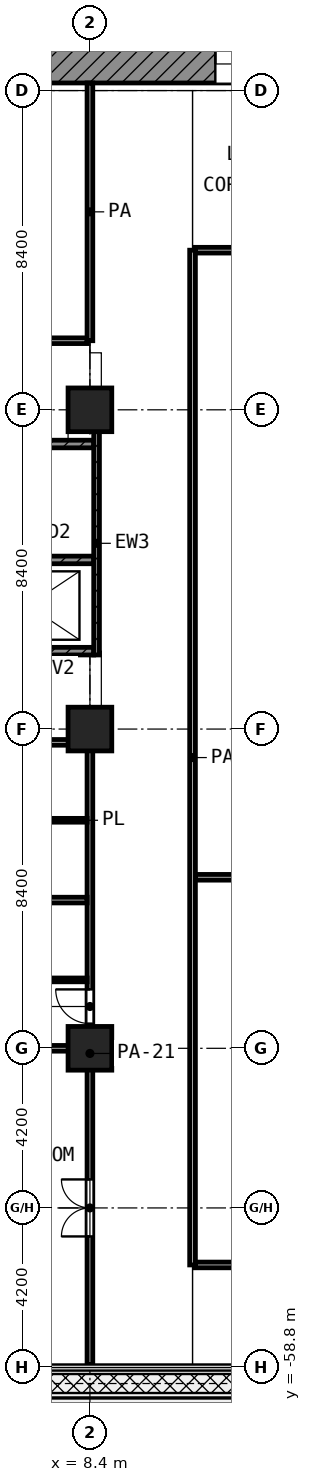
"""IFC4 building model, lengths in metres.
Left out: names, types, materials, properties, quantities, classifications, styles, units other than length and angle.
Written with IfcOpenShell. Run it as: python <this file> out.ifc"""

import sys

from ifc_helpers import new_model, si_unit, direction, frame, frame_2d, origin, origin_2d, place, context, subcontext, project, spatial, rectangle, extrude, element, fill, save


model = new_model("IFC4")
c1 = context("Model", 3, precision=1e-05, world=origin(), true_north=direction((0.0, 1.0)))
c2 = subcontext(c1, "Body", "Model", "MODEL_VIEW")
j1 = project(units=[si_unit("LENGTHUNIT", "METRE"), si_unit("PLANEANGLEUNIT", "RADIAN")], contexts=[c1])
p1 = place(None, origin())
s1 = spatial("IfcSite", under=j1, at=p1, CompositionType="ELEMENT")
p2 = place(p1, origin())
s2 = spatial("IfcBuilding", under=s1, at=p2, CompositionType="ELEMENT")
p3 = place(p2, frame((0.0, 0.0, 132.4)))
s3 = spatial("IfcBuildingStorey", under=s2, at=p3, CompositionType="ELEMENT", Elevation=132.4)
for number, where, z_axis, x_axis in (
    (1, (8.4, -33.6, 0.0), (0.0, 0.0, 1.0), (1.0, 0.0, 0.0)),
    (2, (8.4, -42.0, 0.0), (0.0, 0.0, 1.0), (1.0, 0.0, 0.0)),
    (3, (8.4, -50.4, 0.0), (0.0, 0.0, 1.0), (1.0, 0.0, 0.0)),
):
    element("IfcColumn", number, at=place(p3, frame(where, z_axis=z_axis, x_axis=x_axis)), inside=s3, PredefinedType="COLUMN", context=c2, shape_type="SweptSolid", body=[
        extrude(rectangle(XDim=1.15, YDim=1.15, at=origin_2d()), origin(), (0.0, 0.0, 1.0), 4.2),
    ])
p4 = place(p3, frame((5.4, -24.5, 0.0), z_axis=(0.0, 0.0, 1.0), x_axis=(1.0, 0.0, 0.0)))
e4 = element("IfcWall", 4, at=p4, inside=s3, PredefinedType="SHEAR", context=c2, shape_type="SweptSolid", body=[
    extrude(rectangle(XDim=18.6, YDim=1.0, at=frame_2d((9.3, 0.0))), origin(), (0.0, 0.0, 1.0), 3.6),
])
p5 = place(p4, frame((6.3, 0.0, 0.0)))
e5 = element("IfcOpeningElement", 5, at=p5, cuts=e4, PredefinedType="OPENING", context=c2, shape_type="SweptSolid", body=[
    extrude(rectangle(XDim=1.8, YDim=2.1, at=frame_2d((0.9, 1.05))), frame((0.0, 0.51, 0.0), z_axis=(0.0, -1.0, 0.0), x_axis=(1.0, 0.0, 0.0)), (0.0, 0.0, 1.0), 1.02),
])
p6 = place(p3, frame((8.575, -40.05, 0.0), z_axis=(0.0, 0.0, 1.0), x_axis=(0.0, 1.0, 0.0)))
e6 = element("IfcWall", 6, at=p6, inside=s3, PredefinedType="SHEAR", context=c2, shape_type="SweptSolid", body=[
    extrude(rectangle(XDim=5.875, YDim=0.15, at=frame_2d((2.938, 0.0))), origin(), (0.0, 0.0, 1.0), 3.6),
])
p7 = place(p3, frame((0.45, -34.5, 0.0), z_axis=(0.0, 0.0, 1.0), x_axis=(1.0, 0.0, 0.0)))
e7 = element("IfcWall", 7, at=p7, inside=s3, PredefinedType="SHEAR", context=c2, shape_type="SweptSolid", body=[
    extrude(rectangle(XDim=8.05, YDim=0.2, at=frame_2d((4.025, 0.0))), origin(), (0.0, 0.0, 1.0), 3.6),
])
p8 = place(p7, frame((0.75, 0.0, 0.0)))
e8 = element("IfcOpeningElement", 8, at=p8, cuts=e7, PredefinedType="OPENING", context=c2, shape_type="SweptSolid", body=[
    extrude(rectangle(XDim=1.1, YDim=2.1, at=frame_2d((0.55, 1.05))), frame((0.0, 0.11, 0.0), z_axis=(0.0, -1.0, 0.0), x_axis=(1.0, 0.0, 0.0)), (0.0, 0.0, 1.0), 0.22),
])
p9 = place(p3, frame((0.45, -37.55, 0.0), z_axis=(0.0, 0.0, 1.0), x_axis=(1.0, 0.0, 0.0)))
e9 = element("IfcWall", 9, at=p9, inside=s3, PredefinedType="SHEAR", context=c2, shape_type="SweptSolid", body=[
    extrude(rectangle(XDim=8.05, YDim=0.2, at=frame_2d((4.025, 0.0))), origin(), (0.0, 0.0, 1.0), 3.6),
])
p10 = place(p9, frame((0.1, 0.0, 0.0)))
e10 = element("IfcOpeningElement", 10, at=p10, cuts=e9, PredefinedType="OPENING", context=c2, shape_type="SweptSolid", body=[
    extrude(rectangle(XDim=1.1, YDim=2.1, at=frame_2d((0.55, 1.05))), frame((0.0, 0.11, 0.0), z_axis=(0.0, -1.0, 0.0), x_axis=(1.0, 0.0, 0.0)), (0.0, 0.0, 1.0), 0.22),
])
p11 = place(p3, frame((0.45, -39.95, 0.0), z_axis=(0.0, 0.0, 1.0), x_axis=(1.0, 0.0, 0.0)))
e11 = element("IfcWall", 11, at=p11, inside=s3, PredefinedType="SHEAR", context=c2, shape_type="SweptSolid", body=[
    extrude(rectangle(XDim=8.05, YDim=0.2, at=frame_2d((4.025, 0.0))), origin(), (0.0, 0.0, 1.0), 3.6),
])
p12 = place(p11, frame((2.0, 0.0, 0.0)))
e12 = element("IfcOpeningElement", 12, at=p12, cuts=e11, PredefinedType="OPENING", context=c2, shape_type="SweptSolid", body=[
    extrude(rectangle(XDim=1.1, YDim=2.1, at=frame_2d((0.55, 1.05))), frame((0.0, 0.11, 0.0), z_axis=(0.0, -1.0, 0.0), x_axis=(1.0, 0.0, 0.0)), (0.0, 0.0, 1.0), 0.22),
])
for number, where, z_axis, x_axis in (
    (13, (5.75, -48.6, 0.0), (0.0, 0.0, 1.0), (1.0, 0.0, 0.0)),
    (14, (5.75, -44.4, 0.0), (0.0, 0.0, 1.0), (1.0, 0.0, 0.0)),
):
    element("IfcWall", number, at=place(p3, frame(where, z_axis=z_axis, x_axis=x_axis)), inside=s3, PredefinedType="PARTITIONING", context=c2, shape_type="SweptSolid", body=[
        extrude(rectangle(XDim=2.575, YDim=0.1, at=frame_2d((1.288, 0.0))), origin(), (0.0, 0.0, 1.0), 3.6),
    ])
p13 = place(p3, frame((11.175, -56.1, 0.0), z_axis=(0.0, 0.0, 1.0), x_axis=(1.0, 0.0, 0.0)))
e15 = element("IfcWall", 15, at=p13, inside=s3, PredefinedType="PARTITIONING", context=c2, shape_type="SweptSolid", body=[
    extrude(rectangle(XDim=2.85, YDim=0.15, at=frame_2d((1.425, 0.0))), origin(), (0.0, 0.0, 1.0), 3.6),
])
for number, where, z_axis, x_axis in (
    (16, (0.08, -50.4, 0.0), (0.0, 0.0, 1.0), (1.0, 0.0, 0.0)),
    (17, (0.08, -46.5, 0.0), (0.0, 0.0, 1.0), (1.0, 0.0, 0.0)),
):
    element("IfcWall", number, at=place(p3, frame(where, z_axis=z_axis, x_axis=x_axis)), inside=s3, PredefinedType="PARTITIONING", context=c2, shape_type="SweptSolid", body=[
        extrude(rectangle(XDim=8.245, YDim=0.15, at=frame_2d((4.123, 0.0))), origin(), (0.0, 0.0, 1.0), 3.6),
    ])
p14 = place(p3, frame((11.175, -45.9, 0.0), z_axis=(0.0, 0.0, 1.0), x_axis=(1.0, 0.0, 0.0)))
e18 = element("IfcWall", 18, at=p14, inside=s3, PredefinedType="PARTITIONING", context=c2, shape_type="SweptSolid", body=[
    extrude(rectangle(XDim=2.85, YDim=0.15, at=frame_2d((1.425, 0.0))), origin(), (0.0, 0.0, 1.0), 3.6),
])
p15 = place(p3, frame((2.325, -42.35, 0.0), z_axis=(0.0, 0.0, 1.0), x_axis=(1.0, 0.0, 0.0)))
e19 = element("IfcWall", 19, at=p15, inside=s3, PredefinedType="PARTITIONING", context=c2, shape_type="SweptSolid", body=[
    extrude(rectangle(XDim=6.0, YDim=0.15, at=frame_2d((3.0, 0.0))), origin(), (0.0, 0.0, 1.0), 3.6),
])
p16 = place(p15, frame((3.425, 0.0, 0.0)))
e20 = element("IfcOpeningElement", 20, at=p16, cuts=e19, PredefinedType="OPENING", context=c2, shape_type="SweptSolid", body=[
    extrude(rectangle(XDim=1.2, YDim=2.1, at=frame_2d((0.6, 1.05))), frame((0.0, 0.085, 0.0), z_axis=(0.0, -1.0, 0.0), x_axis=(1.0, 0.0, 0.0)), (0.0, 0.0, 1.0), 0.17),
])
p17 = place(p15, frame((1.375, 0.0, 0.0)))
e21 = element("IfcOpeningElement", 21, at=p17, cuts=e19, PredefinedType="OPENING", context=c2, shape_type="SweptSolid", body=[
    extrude(rectangle(XDim=1.2, YDim=2.1, at=frame_2d((0.6, 1.05))), frame((0.0, 0.085, 0.0), z_axis=(0.0, -1.0, 0.0), x_axis=(1.0, 0.0, 0.0)), (0.0, 0.0, 1.0), 0.17),
])
p18 = place(p3, frame((1.076, -31.782, 0.0), z_axis=(0.0, 0.0, 1.0), x_axis=(1.0, 0.0, 0.0)))
e22 = element("IfcWall", 22, at=p18, inside=s3, PredefinedType="PARTITIONING", context=c2, shape_type="SweptSolid", body=[
    extrude(rectangle(XDim=7.249, YDim=0.15, at=frame_2d((3.625, 0.0))), origin(), (0.0, 0.0, 1.0), 3.6),
])
p19 = place(p18, frame((3.025, 0.0, 0.0)))
e23 = element("IfcOpeningElement", 23, at=p19, cuts=e22, PredefinedType="OPENING", context=c2, shape_type="SweptSolid", body=[
    extrude(rectangle(XDim=1.2, YDim=2.1, at=frame_2d((0.6, 1.05))), frame((0.0, 0.085, 0.0), z_axis=(0.0, -1.0, 0.0), x_axis=(1.0, 0.0, 0.0)), (0.0, 0.0, 1.0), 0.17),
])
p20 = place(p3, frame((11.175, -29.4, 0.0), z_axis=(0.0, 0.0, 1.0), x_axis=(1.0, 0.0, 0.0)))
e24 = element("IfcWall", 24, at=p20, inside=s3, PredefinedType="PARTITIONING", context=c2, shape_type="SweptSolid", body=[
    extrude(rectangle(XDim=2.85, YDim=0.15, at=frame_2d((1.425, 0.0))), origin(), (0.0, 0.0, 1.0), 3.6),
])
p21 = place(p3, frame((8.4, -58.72, 0.0), z_axis=(0.0, 0.0, 1.0), x_axis=(0.0, 1.0, 0.0)))
e25 = element("IfcWall", 25, at=p21, inside=s3, PredefinedType="PARTITIONING", context=c2, shape_type="SweptSolid", body=[
    extrude(rectangle(XDim=16.37, YDim=0.15, at=frame_2d((8.185, 0.0))), origin(), (0.0, 0.0, 1.0), 2.7),
])
p22 = place(p21, frame((8.97, 0.0, 0.0)))
e26 = element("IfcOpeningElement", 26, at=p22, cuts=e25, PredefinedType="OPENING", context=c2, shape_type="SweptSolid", body=[
    extrude(rectangle(XDim=0.9, YDim=2.1, at=frame_2d((0.45, 1.05))), frame((0.0, 0.085, 0.0), z_axis=(0.0, -1.0, 0.0), x_axis=(1.0, 0.0, 0.0)), (0.0, 0.0, 1.0), 0.17),
])
p23 = place(p21, frame((3.37, 0.0, 0.0)))
e27 = element("IfcOpeningElement", 27, at=p23, cuts=e25, PredefinedType="OPENING", context=c2, shape_type="SweptSolid", body=[
    extrude(rectangle(XDim=1.5, YDim=2.1, at=frame_2d((0.75, 1.05))), frame((0.0, 0.085, 0.0), z_axis=(0.0, -1.0, 0.0), x_axis=(1.0, 0.0, 0.0)), (0.0, 0.0, 1.0), 0.17),
])
p24 = place(p3, frame((8.4, -31.782, 0.0), z_axis=(0.0, 0.0, 1.0), x_axis=(0.0, 1.0, 0.0)))
e28 = element("IfcWall", 28, at=p24, inside=s3, PredefinedType="PARTITIONING", context=c2, shape_type="SweptSolid", body=[
    extrude(rectangle(XDim=6.782, YDim=0.15, at=frame_2d((3.391, 0.0))), origin(), (0.0, 0.0, 1.0), 3.6),
])
p25 = place(p3, frame((11.1, -56.1, 0.0), z_axis=(0.0, 0.0, 1.0), x_axis=(0.0, 1.0, 0.0)))
e29 = element("IfcWall", 29, at=p25, inside=s3, PredefinedType="PARTITIONING", context=c2, shape_type="SweptSolid", body=[
    extrude(rectangle(XDim=26.7, YDim=0.15, at=frame_2d((13.35, 0.0))), origin(), (0.0, 0.0, 1.0), 3.6),
])
p26 = place(p5, origin())
e30 = element("IfcDoor", 30, at=p26, inside=s3, OperationType="DOUBLE_DOOR_SINGLE_SWING", PredefinedType="DOOR", context=c2, shape_type="SweptSolid", body=[
    extrude(rectangle(XDim=1.8, YDim=2.1, at=frame_2d((0.9, 1.05))), frame((0.0, 0.025, 0.0), z_axis=(0.0, -1.0, 0.0), x_axis=(1.0, 0.0, 0.0)), (0.0, 0.0, 1.0), 0.05),
])
fill(e5, e30)
p27 = place(p22, origin())
e31 = element("IfcDoor", 31, at=p27, inside=s3, OperationType="SINGLE_SWING_RIGHT", PredefinedType="DOOR", context=c2, shape_type="SweptSolid", body=[
    extrude(rectangle(XDim=0.9, YDim=2.1, at=frame_2d((0.45, 1.05))), frame((0.0, 0.025, 0.0), z_axis=(0.0, -1.0, 0.0), x_axis=(1.0, 0.0, 0.0)), (0.0, 0.0, 1.0), 0.05),
])
fill(e26, e31)
p28 = place(p23, origin())
e32 = element("IfcDoor", 32, at=p28, inside=s3, OperationType="DOUBLE_DOOR_SINGLE_SWING", PredefinedType="DOOR", context=c2, shape_type="SweptSolid", body=[
    extrude(rectangle(XDim=1.5, YDim=2.1, at=frame_2d((0.75, 1.05))), frame((0.0, 0.025, 0.0), z_axis=(0.0, -1.0, 0.0), x_axis=(1.0, 0.0, 0.0)), (0.0, 0.0, 1.0), 0.05),
])
fill(e27, e32)
save(model, sys.argv[1])
